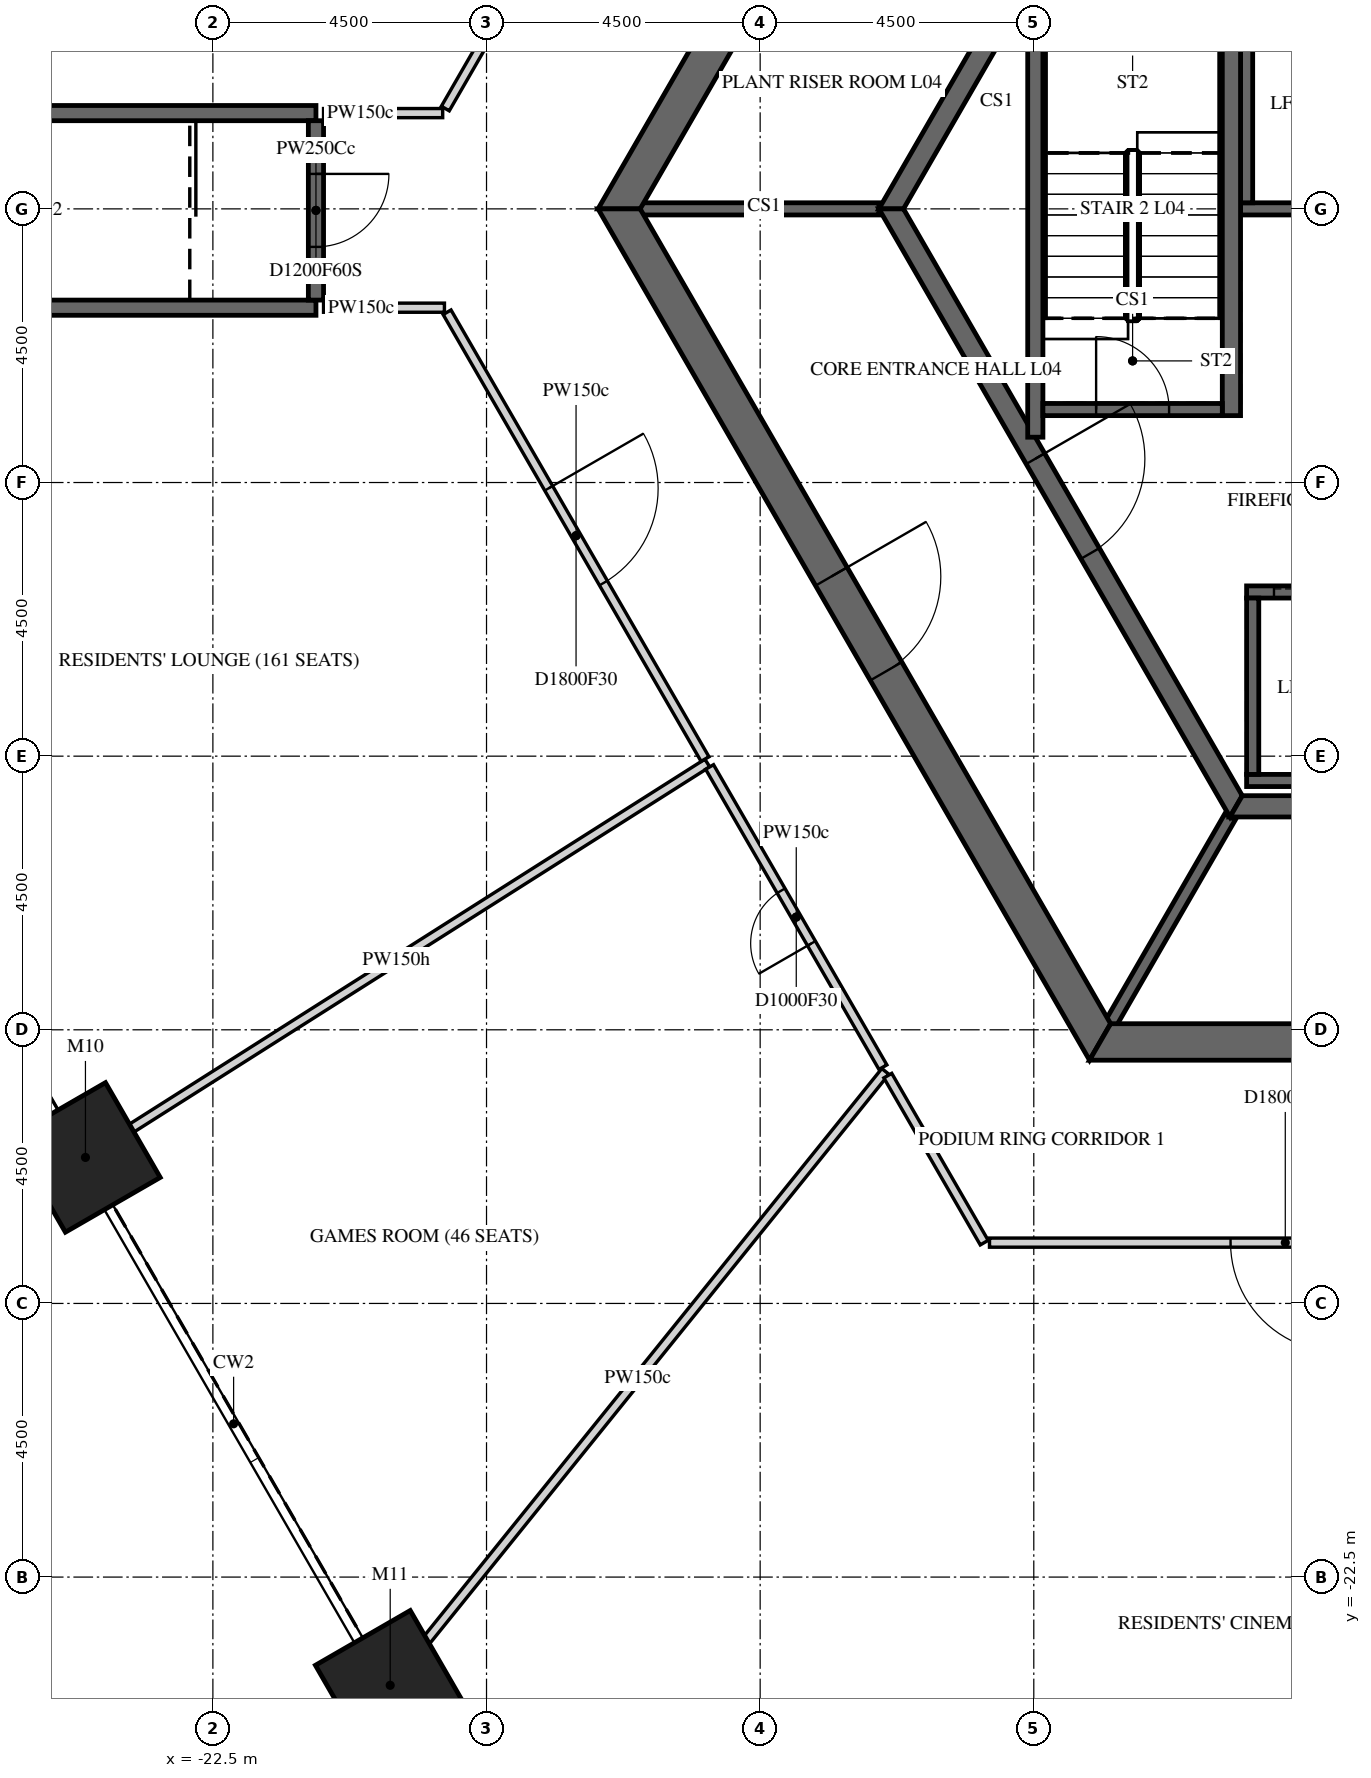
"""IFC4 building model, lengths in metres.
Left out: names, types, materials, properties, quantities, classifications, styles, units other than length and angle.
Written with IfcOpenShell. Run it as: python <this file> out.ifc"""

import sys

from ifc_helpers import new_model, si_unit, direction, frame, frame_2d, origin, origin_2d, place, context, subcontext, project, spatial, polyline, rectangle, outline, extrude, element, fill, save


model = new_model("IFC4")
c1 = context("Model", 3, precision=1e-05, world=origin(), true_north=direction((0.0, 1.0)))
c2 = subcontext(c1, "Body", "Model", "MODEL_VIEW")
j1 = project(units=[si_unit("LENGTHUNIT", "METRE"), si_unit("PLANEANGLEUNIT", "RADIAN")], contexts=[c1])
p1 = place(None, origin())
s1 = spatial("IfcSite", under=j1, at=p1, CompositionType="ELEMENT")
p2 = place(p1, origin())
s2 = spatial("IfcBuilding", under=s1, at=p2, CompositionType="ELEMENT")
p3 = place(p2, frame((0.0, 0.0, 26.0)))
s3 = spatial("IfcBuildingStorey", under=s2, at=p3, CompositionType="ELEMENT", Elevation=26.0)
for number, where, z_axis, x_axis in (
    (1, (-24.596, -15.599, -0.25), (0.0, 0.0, 1.0), (-0.5, 0.866, 0.0)),
    (2, (-19.584, -24.28, -0.25), (0.0, 0.0, 1.0), (-0.5, 0.866, 0.0)),
):
    element("IfcColumn", number, at=place(p3, frame(where, z_axis=z_axis, x_axis=x_axis)), inside=s3, PredefinedType="COLUMN", context=c2, shape_type="SweptSolid", body=[
        extrude(rectangle(XDim=1.8, YDim=1.8, at=origin_2d()), origin(), (0.0, 0.0, 1.0), 5.45),
    ])
p4 = place(p3, frame((-7.91, 13.7, -0.25), z_axis=(0.0, 0.0, 1.0), x_axis=(-0.499999880136, -0.866025472988, 0.0)))
e3 = element("IfcWall", 3, at=p4, inside=s3, PredefinedType="SHEAR", context=c2, shape_type="SweptSolid", body=[
    extrude(outline(polyline([(-0.173, -0.3), (15.993, -0.3), (15.646, 0.3), (0.173, 0.3), (-0.173, -0.3)])), origin(), (0.0, 0.0, 1.0), 5.45),
])
p5 = place(p4, frame((7.039, 0.0, 0.25)))
e4 = element("IfcOpeningElement", 4, at=p5, cuts=e3, PredefinedType="OPENING", context=c2, shape_type="SweptSolid", body=[
    extrude(rectangle(XDim=1.8, YDim=2.4, at=frame_2d((0.9, 1.2))), frame((0.0, 0.31, 0.0), z_axis=(0.0, -1.0, 0.0), x_axis=(1.0, 0.0, 0.0)), (0.0, 0.0, 1.0), 0.62),
])
p6 = place(p3, frame((-15.819, 0.0, -0.25), z_axis=(0.0, 0.0, 1.0), x_axis=(0.499999880136, -0.866025472988, 0.0)))
e5 = element("IfcWall", 5, at=p6, inside=s3, PredefinedType="SHEAR", context=c2, shape_type="SweptSolid", body=[
    extrude(outline(polyline([(-0.173, -0.3), (15.993, -0.3), (15.646, 0.3), (0.173, 0.3), (-0.173, -0.3)])), origin(), (0.0, 0.0, 1.0), 5.45),
])
p7 = place(p6, frame((6.981, 0.0, 0.25)))
e6 = element("IfcOpeningElement", 6, at=p7, cuts=e5, PredefinedType="OPENING", context=c2, shape_type="SweptSolid", body=[
    extrude(rectangle(XDim=1.8, YDim=2.4, at=frame_2d((0.9, 1.2))), frame((0.0, 0.31, 0.0), z_axis=(0.0, -1.0, 0.0), x_axis=(1.0, 0.0, 0.0)), (0.0, 0.0, 1.0), 0.62),
])
p8 = place(p3, frame((-7.91, -13.7, -0.25), z_axis=(0.0, 0.0, 1.0), x_axis=(1.0, 0.0, 0.0)))
e7 = element("IfcWall", 7, at=p8, inside=s3, PredefinedType="SHEAR", context=c2, shape_type="SweptSolid", body=[
    extrude(outline(polyline([(-0.173, -0.3), (15.993, -0.3), (15.646, 0.3), (0.173, 0.3), (-0.173, -0.3)])), origin(), (0.0, 0.0, 1.0), 5.45),
])
p9 = place(p8, frame((7.31, 0.0, 0.25)))
e8 = element("IfcOpeningElement", 8, at=p9, cuts=e7, PredefinedType="OPENING", context=c2, shape_type="SweptSolid", body=[
    extrude(rectangle(XDim=1.2, YDim=2.4, at=frame_2d((0.6, 1.2))), frame((0.0, 0.31, 0.0), z_axis=(0.0, -1.0, 0.0), x_axis=(1.0, 0.0, 0.0)), (0.0, 0.0, 1.0), 0.62),
])
p10 = place(p3, frame((-5.673, 9.825, -0.25), z_axis=(0.0, 0.0, 1.0), x_axis=(-0.499995046907, -0.866028263435, 0.0)))
e9 = element("IfcWall", 9, at=p10, inside=s3, PredefinedType="SHEAR", context=c2, shape_type="SweptSolid", body=[
    extrude(outline(polyline([(-0.101, -0.175), (11.446, -0.175), (11.244, 0.175), (0.101, 0.175), (-0.101, -0.175)])), origin(), (0.0, 0.0, 1.0), 5.45),
])
p11 = place(p10, frame((4.801, 0.0, 0.25)))
e10 = element("IfcOpeningElement", 10, at=p11, cuts=e9, PredefinedType="OPENING", context=c2, shape_type="SweptSolid", body=[
    extrude(rectangle(XDim=1.8, YDim=2.4, at=frame_2d((0.9, 1.2))), frame((0.0, 0.185, 0.0), z_axis=(0.0, -1.0, 0.0), x_axis=(1.0, 0.0, 0.0)), (0.0, 0.0, 1.0), 0.37),
])
p12 = place(p3, frame((-11.345, 0.0, -0.25), z_axis=(0.0, 0.0, 1.0), x_axis=(0.499995046907, -0.866028263435, 0.0)))
e11 = element("IfcWall", 11, at=p12, inside=s3, PredefinedType="SHEAR", context=c2, shape_type="SweptSolid", body=[
    extrude(outline(polyline([(-0.101, -0.175), (11.446, -0.175), (11.244, 0.175), (0.101, 0.175), (-0.101, -0.175)])), origin(), (0.0, 0.0, 1.0), 5.45),
])
p13 = place(p12, frame((4.744, 0.0, 0.25)))
e12 = element("IfcOpeningElement", 12, at=p13, cuts=e11, PredefinedType="OPENING", context=c2, shape_type="SweptSolid", body=[
    extrude(rectangle(XDim=1.8, YDim=2.4, at=frame_2d((0.9, 1.2))), frame((0.0, 0.185, 0.0), z_axis=(0.0, -1.0, 0.0), x_axis=(1.0, 0.0, 0.0)), (0.0, 0.0, 1.0), 0.37),
])
p14 = place(p3, frame((-5.673, -9.825, -0.25), z_axis=(0.0, 0.0, 1.0), x_axis=(1.0, 0.0, 0.0)))
e13 = element("IfcWall", 13, at=p14, inside=s3, PredefinedType="SHEAR", context=c2, shape_type="SweptSolid", body=[
    extrude(outline(polyline([(-0.101, -0.175), (11.446, -0.175), (11.244, 0.175), (0.101, 0.175), (-0.101, -0.175)])), origin(), (0.0, 0.0, 1.0), 5.45),
])
p15 = place(p3, frame((-5.6, 0.0, -0.25), z_axis=(0.0, 0.0, 1.0), x_axis=(1.0, 0.0, 0.0)))
e14 = element("IfcWall", 14, at=p15, inside=s3, PredefinedType="SHEAR", context=c2, shape_type="SweptSolid", body=[
    extrude(rectangle(XDim=11.2, YDim=0.2, at=frame_2d((5.6, 0.0))), origin(), (0.0, 0.0, 1.0), 5.5),
])
p16 = place(p3, frame((-5.5, 0.1, -0.25), z_axis=(0.0, 0.0, 1.0), x_axis=(0.0, 1.0, 0.0)))
e15 = element("IfcWall", 15, at=p16, inside=s3, PredefinedType="SHEAR", context=c2, shape_type="SweptSolid", body=[
    extrude(rectangle(XDim=3.1, YDim=0.2, at=frame_2d((1.55, 0.0))), origin(), (0.0, 0.0, 1.0), 5.5),
])
p17 = place(p3, frame((-5.5, -6.3, -0.25), z_axis=(0.0, 0.0, 1.0), x_axis=(1.0, 0.0, 0.0)))
e16 = element("IfcWall", 16, at=p17, inside=s3, PredefinedType="SHEAR", context=c2, shape_type="SweptSolid", body=[
    extrude(rectangle(XDim=9.2, YDim=0.2, at=frame_2d((4.6, 0.0))), origin(), (0.0, 0.0, 1.0), 5.5),
])
p18 = place(p17, frame((0.45, 0.0, 0.25)))
e17 = element("IfcOpeningElement", 17, at=p18, cuts=e16, PredefinedType="OPENING", context=c2, shape_type="SweptSolid", body=[
    extrude(rectangle(XDim=1.1, YDim=2.1, at=frame_2d((0.55, 1.05))), frame((0.0, 0.11, 0.0), z_axis=(0.0, -1.0, 0.0), x_axis=(1.0, 0.0, 0.0)), (0.0, 0.0, 1.0), 0.22),
])
p19 = place(p17, frame((2.25, 0.0, 0.25)))
e18 = element("IfcOpeningElement", 18, at=p19, cuts=e16, PredefinedType="OPENING", context=c2, shape_type="SweptSolid", body=[
    extrude(rectangle(XDim=1.1, YDim=2.1, at=frame_2d((0.55, 1.05))), frame((0.0, 0.11, 0.0), z_axis=(0.0, -1.0, 0.0), x_axis=(1.0, 0.0, 0.0)), (0.0, 0.0, 1.0), 0.22),
])
p20 = place(p17, frame((4.05, 0.0, 0.25)))
e19 = element("IfcOpeningElement", 19, at=p20, cuts=e16, PredefinedType="OPENING", context=c2, shape_type="SweptSolid", body=[
    extrude(rectangle(XDim=1.1, YDim=2.1, at=frame_2d((0.55, 1.05))), frame((0.0, 0.11, 0.0), z_axis=(0.0, -1.0, 0.0), x_axis=(1.0, 0.0, 0.0)), (0.0, 0.0, 1.0), 0.22),
])
p21 = place(p17, frame((5.85, 0.0, 0.25)))
e20 = element("IfcOpeningElement", 20, at=p21, cuts=e16, PredefinedType="OPENING", context=c2, shape_type="SweptSolid", body=[
    extrude(rectangle(XDim=1.1, YDim=2.1, at=frame_2d((0.55, 1.05))), frame((0.0, 0.11, 0.0), z_axis=(0.0, -1.0, 0.0), x_axis=(1.0, 0.0, 0.0)), (0.0, 0.0, 1.0), 0.22),
])
p22 = place(p17, frame((7.65, 0.0, 0.25)))
e21 = element("IfcOpeningElement", 21, at=p22, cuts=e16, PredefinedType="OPENING", context=c2, shape_type="SweptSolid", body=[
    extrude(rectangle(XDim=1.1, YDim=2.1, at=frame_2d((0.55, 1.05))), frame((0.0, 0.11, 0.0), z_axis=(0.0, -1.0, 0.0), x_axis=(1.0, 0.0, 0.0)), (0.0, 0.0, 1.0), 0.22),
])
p23 = place(p3, frame((-5.5, -9.4, -0.25), z_axis=(0.0, 0.0, 1.0), x_axis=(1.0, 0.0, 0.0)))
e22 = element("IfcWall", 22, at=p23, inside=s3, PredefinedType="SHEAR", context=c2, shape_type="SweptSolid", body=[
    extrude(rectangle(XDim=9.2, YDim=0.2, at=frame_2d((4.6, 0.0))), origin(), (0.0, 0.0, 1.0), 5.5),
])
p24 = place(p3, frame((-5.4, -9.3, -0.25), z_axis=(0.0, 0.0, 1.0), x_axis=(0.0, 1.0, 0.0)))
e23 = element("IfcWall", 23, at=p24, inside=s3, PredefinedType="SHEAR", context=c2, shape_type="SweptSolid", body=[
    extrude(rectangle(XDim=2.9, YDim=0.2, at=frame_2d((1.45, 0.0))), origin(), (0.0, 0.0, 1.0), 5.5),
])
p25 = place(p3, frame((-11.547, 0.0, -0.25), z_axis=(0.0, 0.0, 1.0), x_axis=(-1.0, 0.0, 0.0)))
e24 = element("IfcWall", 24, at=p25, inside=s3, PredefinedType="SHEAR", context=c2, shape_type="SweptSolid", body=[
    extrude(rectangle(XDim=3.926, YDim=0.2, at=frame_2d((1.963, 0.0))), origin(), (0.0, 0.0, 1.0), 5.45),
])
p26 = place(p3, frame((-5.773, -10.0, -0.25), z_axis=(0.0, 0.0, 1.0), x_axis=(-0.500038251005, -0.86600331843, 0.0)))
e25 = element("IfcWall", 25, at=p26, inside=s3, PredefinedType="SHEAR", context=c2, shape_type="SweptSolid", body=[
    extrude(rectangle(XDim=3.926, YDim=0.2, at=frame_2d((1.963, 0.0))), origin(), (0.0, 0.0, 1.0), 5.45),
])
p27 = place(p3, frame((-5.75, -3.4, -0.25), z_axis=(0.0, 0.0, 1.0), x_axis=(0.0, 1.0, 0.0)))
e26 = element("IfcWall", 26, at=p27, inside=s3, PredefinedType="SHEAR", context=c2, shape_type="SweptSolid", body=[
    extrude(rectangle(XDim=6.8, YDim=0.3, at=frame_2d((3.4, 0.0))), origin(), (0.0, 0.0, 1.0), 5.5),
])
p28 = place(p3, frame((-8.975, -3.755, -0.25), z_axis=(0.0, 0.0, 1.0), x_axis=(0.0, 1.0, 0.0)))
e27 = element("IfcWall", 27, at=p28, inside=s3, PredefinedType="SHEAR", context=c2, shape_type="SweptSolid", body=[
    extrude(rectangle(XDim=7.51, YDim=0.25, at=frame_2d((3.755, 0.0))), origin(), (0.0, 0.0, 1.0), 5.5),
])
p29 = place(p3, frame((-8.85, -3.3, -0.25), z_axis=(0.0, 0.0, 1.0), x_axis=(1.0, 0.0, 0.0)))
e28 = element("IfcWall", 28, at=p29, inside=s3, PredefinedType="SHEAR", context=c2, shape_type="SweptSolid", body=[
    extrude(rectangle(XDim=2.95, YDim=0.2, at=frame_2d((1.475, 0.0))), origin(), (0.0, 0.0, 1.0), 5.5),
])
p30 = place(p29, frame((0.875, 0.0, 0.25)))
e29 = element("IfcOpeningElement", 29, at=p30, cuts=e28, PredefinedType="OPENING", context=c2, shape_type="SweptSolid", body=[
    extrude(rectangle(XDim=1.2, YDim=2.4, at=frame_2d((0.6, 1.2))), frame((0.0, 0.11, 0.0), z_axis=(0.0, -1.0, 0.0), x_axis=(1.0, 0.0, 0.0)), (0.0, 0.0, 1.0), 0.22),
])
p31 = place(p3, frame((-30.95, 1.575, 0.0), z_axis=(0.0, 0.0, 1.0), x_axis=(1.0, 0.0, 0.0)))
e30 = element("IfcWall", 30, at=p31, inside=s3, PredefinedType="PARTITIONING", context=c2, shape_type="SweptSolid", body=[
    extrude(rectangle(XDim=10.145, YDim=0.25, at=frame_2d((5.073, 0.0))), origin(), (0.0, 0.0, 1.0), 5.2),
])
p32 = place(p3, frame((-24.596, -15.599, 0.0), z_axis=(0.0, 0.0, 1.0), x_axis=(0.844484782983, 0.535579547136, 0.0)))
e31 = element("IfcWall", 31, at=p32, inside=s3, PredefinedType="PARTITIONING", context=c2, shape_type="SweptSolid", body=[
    extrude(rectangle(XDim=12.11, YDim=0.15, at=frame_2d((6.055, 0.0))), origin(), (0.0, 0.0, 1.0), 4.273),
])
p33 = place(p3, frame((-20.805, -1.625, 0.0), z_axis=(0.0, 0.0, 1.0), x_axis=(-1.0, 0.0, 0.0)))
e32 = element("IfcWall", 32, at=p33, inside=s3, PredefinedType="PARTITIONING", context=c2, shape_type="SweptSolid", body=[
    extrude(rectangle(XDim=10.145, YDim=0.25, at=frame_2d((5.073, 0.0))), origin(), (0.0, 0.0, 1.0), 5.2),
])
p34 = place(p3, frame((-20.805, 1.45, 0.0), z_axis=(0.0, 0.0, 1.0), x_axis=(0.0, -1.0, 0.0)))
e33 = element("IfcWall", 33, at=p34, inside=s3, PredefinedType="PARTITIONING", context=c2, shape_type="SweptSolid", body=[
    extrude(rectangle(XDim=2.95, YDim=0.25, at=frame_2d((1.475, 0.0))), origin(), (0.0, 0.0, 1.0), 5.2),
])
p35 = place(p34, frame((0.875, 0.0, 0.0)))
e34 = element("IfcOpeningElement", 34, at=p35, cuts=e33, PredefinedType="OPENING", context=c2, shape_type="SweptSolid", body=[
    extrude(rectangle(XDim=1.2, YDim=2.1, at=frame_2d((0.6, 1.05))), frame((0.0, 0.135, 0.0), z_axis=(0.0, -1.0, 0.0), x_axis=(1.0, 0.0, 0.0)), (0.0, 0.0, 1.0), 0.27),
])
p36 = place(p3, frame((-20.68, 1.575, 0.0), z_axis=(0.0, 0.0, 1.0), x_axis=(1.0, 0.0, 0.0)))
e35 = element("IfcWall", 35, at=p36, inside=s3, PredefinedType="PARTITIONING", context=c2, shape_type="SweptSolid", body=[
    extrude(rectangle(XDim=1.959, YDim=0.15, at=frame_2d((0.979, 0.0))), origin(), (0.0, 0.0, 1.0), 5.2),
])
p37 = place(p3, frame((-19.584, -24.28, 0.0), z_axis=(0.0, 0.0, 1.0), x_axis=(0.627807267634, 0.77836882948, 0.0)))
e36 = element("IfcWall", 36, at=p37, inside=s3, PredefinedType="PARTITIONING", context=c2, shape_type="SweptSolid", body=[
    extrude(rectangle(XDim=12.971, YDim=0.15, at=frame_2d((6.485, 0.0))), origin(), (0.0, 0.0, 1.0), 5.2),
])
p38 = place(p3, frame((-18.692, -1.625, 0.0), z_axis=(0.0, 0.0, 1.0), x_axis=(-1.0, 0.0, 0.0)))
e37 = element("IfcWall", 37, at=p38, inside=s3, PredefinedType="PARTITIONING", context=c2, shape_type="SweptSolid", body=[
    extrude(rectangle(XDim=1.988, YDim=0.15, at=frame_2d((0.994, 0.0))), origin(), (0.0, 0.0, 1.0), 5.2),
])
p39 = place(p3, frame((-18.649, -1.7, 0.0), z_axis=(0.0, 0.0, 1.0), x_axis=(0.499976511579, -0.866038964406, 0.0)))
e38 = element("IfcWall", 38, at=p39, inside=s3, PredefinedType="PARTITIONING", context=c2, shape_type="SweptSolid", body=[
    extrude(rectangle(XDim=8.485, YDim=0.15, at=frame_2d((4.242, 0.0))), origin(), (0.0, 0.0, 1.0), 5.2),
])
p40 = place(p39, frame((3.342, 0.0, 0.0)))
e39 = element("IfcOpeningElement", 39, at=p40, cuts=e38, PredefinedType="OPENING", context=c2, shape_type="SweptSolid", body=[
    extrude(rectangle(XDim=1.8, YDim=2.1, at=frame_2d((0.9, 1.05))), frame((0.0, 0.085, 0.0), z_axis=(0.0, -1.0, 0.0), x_axis=(1.0, 0.0, 0.0)), (0.0, 0.0, 1.0), 0.17),
])
p41 = place(p3, frame((-14.723, 8.5, 0.0), z_axis=(0.0, 0.0, 1.0), x_axis=(-0.499993197506, -0.86602933117, 0.0)))
e40 = element("IfcWall", 40, at=p41, inside=s3, PredefinedType="PARTITIONING", context=c2, shape_type="SweptSolid", body=[
    extrude(rectangle(XDim=7.91, YDim=0.15, at=frame_2d((3.955, 0.0))), origin(), (0.0, 0.0, 1.0), 5.2),
])
p42 = place(p3, frame((-11.481, -14.114, 0.0), z_axis=(0.0, 0.0, 1.0), x_axis=(-0.500049947645, 0.865996564577, 0.0)))
e41 = element("IfcWall", 41, at=p42, inside=s3, PredefinedType="PARTITIONING", context=c2, shape_type="SweptSolid", body=[
    extrude(rectangle(XDim=5.7, YDim=0.15, at=frame_2d((2.85, 0.0))), origin(), (0.0, 0.0, 1.0), 5.2),
])
p43 = place(p42, frame((2.35, 0.0, 0.0)))
e42 = element("IfcOpeningElement", 42, at=p43, cuts=e41, PredefinedType="OPENING", context=c2, shape_type="SweptSolid", body=[
    extrude(rectangle(XDim=1.0, YDim=2.1, at=frame_2d((0.5, 1.05))), frame((0.0, 0.085, 0.0), z_axis=(0.0, -1.0, 0.0), x_axis=(1.0, 0.0, 0.0)), (0.0, 0.0, 1.0), 0.17),
])
p44 = place(p3, frame((-11.401, -14.254, 0.0), z_axis=(0.0, 0.0, 1.0), x_axis=(0.500080068905, -0.865979171045, 0.0)))
e43 = element("IfcWall", 43, at=p44, inside=s3, PredefinedType="PARTITIONING", context=c2, shape_type="SweptSolid", body=[
    extrude(rectangle(XDim=3.171, YDim=0.15, at=frame_2d((1.586, 0.0))), origin(), (0.0, 0.0, 1.0), 5.2),
])
p45 = place(p3, frame((0.0, -17.0, 0.0), z_axis=(0.0, 0.0, 1.0), x_axis=(-1.0, 0.0, 0.0)))
e44 = element("IfcWall", 44, at=p45, inside=s3, PredefinedType="PARTITIONING", context=c2, shape_type="SweptSolid", body=[
    extrude(rectangle(XDim=9.729, YDim=0.15, at=frame_2d((4.864, 0.0))), origin(), (0.0, 0.0, 1.0), 5.2),
])
p46 = place(p45, frame((3.964, 0.0, 0.0)))
e45 = element("IfcOpeningElement", 45, at=p46, cuts=e44, PredefinedType="OPENING", context=c2, shape_type="SweptSolid", body=[
    extrude(rectangle(XDim=1.8, YDim=2.1, at=frame_2d((0.9, 1.05))), frame((0.0, 0.085, 0.0), z_axis=(0.0, -1.0, 0.0), x_axis=(1.0, 0.0, 0.0)), (0.0, 0.0, 1.0), 0.17),
])
p47 = place(p7, origin())
e46 = element("IfcDoor", 46, at=p47, inside=s3, OperationType="DOUBLE_DOOR_SINGLE_SWING", PredefinedType="DOOR", context=c2, shape_type="SweptSolid", body=[
    extrude(rectangle(XDim=1.8, YDim=2.4, at=frame_2d((0.9, 1.2))), frame((0.0, 0.025, 0.0), z_axis=(0.0, -1.0, 0.0), x_axis=(1.0, 0.0, 0.0)), (0.0, 0.0, 1.0), 0.05),
])
fill(e6, e46)
p48 = place(p13, origin())
e47 = element("IfcDoor", 47, at=p48, inside=s3, OperationType="DOUBLE_DOOR_SINGLE_SWING", PredefinedType="DOOR", context=c2, shape_type="SweptSolid", body=[
    extrude(rectangle(XDim=1.8, YDim=2.4, at=frame_2d((0.9, 1.2))), frame((0.0, 0.025, 0.0), z_axis=(0.0, -1.0, 0.0), x_axis=(1.0, 0.0, 0.0)), (0.0, 0.0, 1.0), 0.05),
])
fill(e12, e47)
p49 = place(p30, origin())
e48 = element("IfcDoor", 48, at=p49, inside=s3, OperationType="SINGLE_SWING_LEFT", PredefinedType="DOOR", context=c2, shape_type="SweptSolid", body=[
    extrude(rectangle(XDim=1.2, YDim=2.4, at=frame_2d((0.6, 1.2))), frame((0.0, 0.025, 0.0), z_axis=(0.0, -1.0, 0.0), x_axis=(1.0, 0.0, 0.0)), (0.0, 0.0, 1.0), 0.05),
])
fill(e29, e48)
p50 = place(p18, origin())
e49 = element("IfcDoor", 49, at=p50, inside=s3, OperationType="SLIDING_TO_LEFT", PredefinedType="DOOR", context=c2, shape_type="SweptSolid", body=[
    extrude(rectangle(XDim=1.1, YDim=2.1, at=frame_2d((0.55, 1.05))), frame((0.0, 0.025, 0.0), z_axis=(0.0, -1.0, 0.0), x_axis=(1.0, 0.0, 0.0)), (0.0, 0.0, 1.0), 0.05),
])
fill(e17, e49)
p51 = place(p35, origin())
e50 = element("IfcDoor", 50, at=p51, inside=s3, OperationType="SINGLE_SWING_RIGHT", PredefinedType="DOOR", context=c2, shape_type="SweptSolid", body=[
    extrude(rectangle(XDim=1.2, YDim=2.1, at=frame_2d((0.6, 1.05))), frame((0.0, 0.025, 0.0), z_axis=(0.0, -1.0, 0.0), x_axis=(1.0, 0.0, 0.0)), (0.0, 0.0, 1.0), 0.05),
])
fill(e34, e50)
p52 = place(p40, origin())
e51 = element("IfcDoor", 51, at=p52, inside=s3, OperationType="DOUBLE_DOOR_SINGLE_SWING", PredefinedType="DOOR", context=c2, shape_type="SweptSolid", body=[
    extrude(rectangle(XDim=1.8, YDim=2.1, at=frame_2d((0.9, 1.05))), frame((0.0, 0.025, 0.0), z_axis=(0.0, -1.0, 0.0), x_axis=(1.0, 0.0, 0.0)), (0.0, 0.0, 1.0), 0.05),
])
fill(e39, e51)
p53 = place(p43, origin())
e52 = element("IfcDoor", 52, at=p53, inside=s3, OperationType="SINGLE_SWING_RIGHT", PredefinedType="DOOR", context=c2, shape_type="SweptSolid", body=[
    extrude(rectangle(XDim=1.0, YDim=2.1, at=frame_2d((0.5, 1.05))), frame((0.0, 0.025, 0.0), z_axis=(0.0, -1.0, 0.0), x_axis=(1.0, 0.0, 0.0)), (0.0, 0.0, 1.0), 0.05),
])
fill(e42, e52)
p54 = place(p46, origin())
e53 = element("IfcDoor", 53, at=p54, inside=s3, OperationType="DOUBLE_DOOR_SINGLE_SWING", PredefinedType="DOOR", context=c2, shape_type="SweptSolid", body=[
    extrude(rectangle(XDim=1.8, YDim=2.1, at=frame_2d((0.9, 1.05))), frame((0.0, 0.025, 0.0), z_axis=(0.0, -1.0, 0.0), x_axis=(1.0, 0.0, 0.0)), (0.0, 0.0, 1.0), 0.05),
])
fill(e45, e53)
save(model, sys.argv[1])
